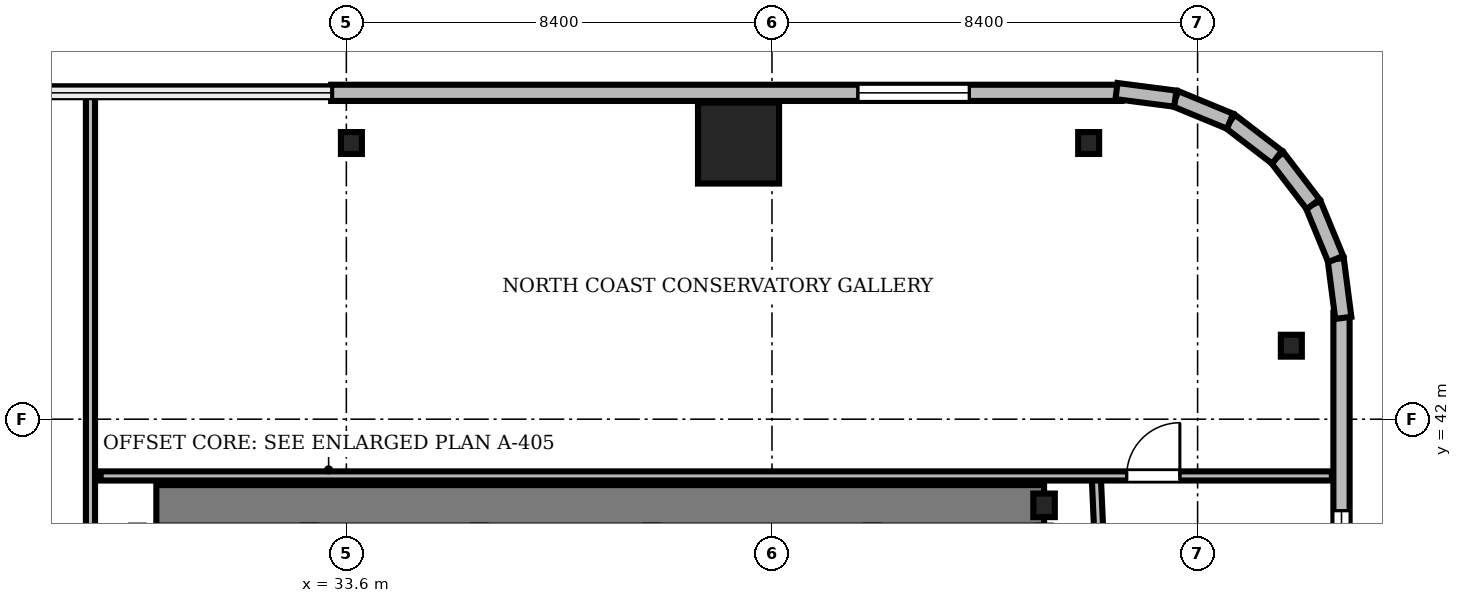
"""IFC4 building model, lengths in metres.
Left out: names, types, materials, properties, quantities, classifications, styles, units other than length and angle.
Written with IfcOpenShell. Run it as: python <this file> out.ifc"""

import sys

from ifc_helpers import new_model, si_unit, direction, frame, frame_2d, origin, origin_2d, place, context, subcontext, project, spatial, rectangle, i_section, extrude, source, transform, mapped, element, fill, save


model = new_model("IFC4")
c1 = context("Model", 3, precision=1e-05, world=origin(), true_north=direction((0.0, 1.0)))
c2 = subcontext(c1, "Body", "Model", "MODEL_VIEW")
j1 = project(units=[si_unit("LENGTHUNIT", "METRE"), si_unit("PLANEANGLEUNIT", "RADIAN")], contexts=[c1])
p1 = place(None, origin())
s1 = spatial("IfcSite", under=j1, at=p1, CompositionType="ELEMENT")
p2 = place(p1, origin())
s2 = spatial("IfcBuilding", under=s1, at=p2, CompositionType="ELEMENT")
p3 = place(p2, frame((0.0, 0.0, 98.7)))
s3 = spatial("IfcBuildingStorey", under=s2, at=p3, CompositionType="ELEMENT", Elevation=98.7)
m1 = source(origin(), c2, "Body", "SweptSolid", [
    extrude(rectangle(XDim=17.52, YDim=0.8, at=frame_2d((8.76, 0.0))), origin(), (0.0, 0.0, 1.0), 4.76),
])
p4 = place(p3, frame((29.85, 40.3, 0.0), z_axis=(0.0, 0.0, 1.0), x_axis=(1.0, 0.0, 0.0)))
e1 = element("IfcWall", 1, at=p4, inside=s3, PredefinedType="SHEAR", context=c2, shape_type="MappedRepresentation", body=[
    mapped(m1, transform((0.0, 0.0, 0.0), scale=1.0)),
])
m2 = source(origin(), c2, "Body", "SweptSolid", [
    extrude(i_section(OverallWidth=0.424, OverallDepth=0.465, WebThickness=0.035, FlangeThickness=0.056, FilletRadius=0.015, at=origin_2d()), origin(), (0.0, 0.0, 1.0), 4.76),
])
p5 = place(p3, frame((47.37, 40.3, 0.0), z_axis=(0.0, 0.0, 1.0), x_axis=(1.0, 0.0, 0.0)))
e2 = element("IfcColumn", 2, at=p5, inside=s3, PredefinedType="COLUMN", context=c2, shape_type="MappedRepresentation", body=[
    mapped(m2, transform((0.0, 0.0, 0.0), scale=1.0)),
])
m3 = source(origin(), c2, "Body", "SweptSolid", [
    extrude(rectangle(XDim=1.6, YDim=1.6, at=origin_2d()), origin(), (0.0, 0.0, 1.0), 4.76),
])
p6 = place(p3, frame((41.34, 47.45, 0.0), z_axis=(0.0, 0.0, 1.0), x_axis=(1.0, 0.0, 0.0)))
e3 = element("IfcColumn", 3, at=p6, inside=s3, PredefinedType="COLUMN", context=c2, shape_type="MappedRepresentation", body=[
    mapped(m3, transform((0.0, 0.0, 0.0), scale=1.0)),
])
m4 = source(origin(), c2, "Body", "SweptSolid", [
    extrude(i_section(OverallWidth=0.414, OverallDepth=0.432, WebThickness=0.026, FlangeThickness=0.04, FilletRadius=0.015, at=origin_2d()), origin(), (0.0, 0.0, 1.0), 4.76),
])
for number, where, z_axis, x_axis in (
    (4, (52.25, 43.45, 0.0), (0.0, 0.0, 1.0), (1.0, 0.0, 0.0)),
    (5, (48.25, 47.45, 0.0), (0.0, 0.0, 1.0), (1.0, 0.0, 0.0)),
    (6, (33.7, 47.45, 0.0), (0.0, 0.0, 1.0), (1.0, 0.0, 0.0)),
):
    element("IfcColumn", number, at=place(p3, frame(where, z_axis=z_axis, x_axis=x_axis)), inside=s3, PredefinedType="COLUMN", context=c2, shape_type="MappedRepresentation", body=[
        mapped(m4, transform((0.0, 0.0, 0.0), scale=1.0)),
    ])
m5 = source(origin(), c2, "Body", "SweptSolid", [
    extrude(rectangle(XDim=15.6, YDim=0.32, at=frame_2d((7.8, 0.0))), origin(), (0.0, 0.0, 1.0), 4.76),
])
p7 = place(p3, frame((48.9, 48.44, 0.0), z_axis=(0.0, 0.0, 1.0), x_axis=(-1.0, 0.0, 0.0)))
e7 = element("IfcWall", 7, at=p7, inside=s3, PredefinedType="SOLIDWALL", context=c2, shape_type="MappedRepresentation", body=[
    mapped(m5, transform((0.0, 0.0, 0.0), scale=1.0)),
])
m6 = source(origin(), c2, "Body", "SweptSolid", [
    extrude(rectangle(XDim=2.2, YDim=2.4, at=frame_2d((1.1, 1.2))), frame((0.0, 0.17, 0.0), z_axis=(0.0, -1.0, 0.0), x_axis=(1.0, 0.0, 0.0)), (0.0, 0.0, 1.0), 0.34),
])
p8 = place(p7, frame((3.005, 0.0, 0.72)))
e8 = element("IfcOpeningElement", 8, at=p8, cuts=e7, PredefinedType="OPENING", context=c2, shape_type="MappedRepresentation", body=[
    mapped(m6, transform((0.0, 0.0, 0.0), scale=1.0)),
])
m7 = source(origin(), c2, "Body", "SweptSolid", [
    extrude(rectangle(XDim=15.6, YDim=0.32, at=frame_2d((7.8, 0.0))), origin(), (0.0, 0.0, 1.0), 4.76),
])
p9 = place(p3, frame((53.24, 28.5, 0.0), z_axis=(0.0, 0.0, 1.0), x_axis=(0.0, 1.0, 0.0)))
e9 = element("IfcWall", 9, at=p9, inside=s3, PredefinedType="SOLIDWALL", context=c2, shape_type="MappedRepresentation", body=[
    mapped(m7, transform((0.0, 0.0, 0.0), scale=1.0)),
])
p10 = place(p9, frame((9.495, 0.0, 0.72)))
e10 = element("IfcOpeningElement", 10, at=p10, cuts=e9, PredefinedType="OPENING", context=c2, shape_type="MappedRepresentation", body=[
    mapped(m6, transform((0.0, 0.0, 0.0), scale=1.0)),
])
m8 = source(origin(), c2, "Body", "SweptSolid", [
    extrude(rectangle(XDim=1.17, YDim=0.32, at=frame_2d((0.585, 0.0))), origin(), (0.0, 0.0, 1.0), 4.76),
])
p11 = place(p3, frame((53.276, 44.0, 0.0), z_axis=(0.0, 0.0, 1.0), x_axis=(-0.128295670475, 0.991735963317, 0.0)))
e11 = element("IfcWall", 11, at=p11, inside=s3, PredefinedType="SOLIDWALL", context=c2, shape_type="MappedRepresentation", body=[
    mapped(m8, transform((0.0, 0.0, 0.0), scale=1.0)),
])
m9 = source(origin(), c2, "Body", "SweptSolid", [
    extrude(rectangle(XDim=1.169, YDim=0.32, at=frame_2d((0.584, 0.0))), origin(), (0.0, 0.0, 1.0), 4.76),
])
p12 = place(p3, frame((53.125, 45.16, 0.0), z_axis=(0.0, 0.0, 1.0), x_axis=(-0.381054331552, 0.924552646638, 0.0)))
e12 = element("IfcWall", 12, at=p12, inside=s3, PredefinedType="SOLIDWALL", context=c2, shape_type="MappedRepresentation", body=[
    mapped(m9, transform((0.0, 0.0, 0.0), scale=1.0)),
])
m10 = source(origin(), c2, "Body", "SweptSolid", [
    extrude(rectangle(XDim=1.169, YDim=0.32, at=frame_2d((0.584, 0.0))), origin(), (0.0, 0.0, 1.0), 4.76),
])
p13 = place(p3, frame((52.68, 46.241, 0.0), z_axis=(0.0, 0.0, 1.0), x_axis=(-0.608387696831, 0.793639975269, 0.0)))
e13 = element("IfcWall", 13, at=p13, inside=s3, PredefinedType="SOLIDWALL", context=c2, shape_type="MappedRepresentation", body=[
    mapped(m10, transform((0.0, 0.0, 0.0), scale=1.0)),
])
m11 = source(origin(), c2, "Body", "SweptSolid", [
    extrude(rectangle(XDim=1.169, YDim=0.32, at=frame_2d((0.584, 0.0))), origin(), (0.0, 0.0, 1.0), 4.76),
])
p14 = place(p3, frame((51.969, 47.169, 0.0), z_axis=(0.0, 0.0, 1.0), x_axis=(-0.793663520347, 0.608356981114, 0.0)))
e14 = element("IfcWall", 14, at=p14, inside=s3, PredefinedType="SOLIDWALL", context=c2, shape_type="MappedRepresentation", body=[
    mapped(m11, transform((0.0, 0.0, 0.0), scale=1.0)),
])
p15 = place(p3, frame((51.041, 47.88, 0.0), z_axis=(0.0, 0.0, 1.0), x_axis=(-0.924552646638, 0.381054331552, 0.0)))
e15 = element("IfcWall", 15, at=p15, inside=s3, PredefinedType="SOLIDWALL", context=c2, shape_type="MappedRepresentation", body=[
    mapped(m9, transform((0.0, 0.0, 0.0), scale=1.0)),
])
p16 = place(p3, frame((49.96, 48.325, 0.0), z_axis=(0.0, 0.0, 1.0), x_axis=(-0.991735963317, 0.128295670475, 0.0)))
e16 = element("IfcWall", 16, at=p16, inside=s3, PredefinedType="SOLIDWALL", context=c2, shape_type="MappedRepresentation", body=[
    mapped(m8, transform((0.0, 0.0, 0.0), scale=1.0)),
])
m12 = source(origin(), c2, "Body", "SweptSolid", [
    extrude(rectangle(XDim=27.106, YDim=0.18, at=frame_2d((13.553, 0.0))), origin(), (0.0, 0.0, 1.0), 4.152),
])
p17 = place(p3, frame((49.6, 13.8, 0.0), z_axis=(0.0, 0.0, 1.0), x_axis=(-0.044277164483, 0.999019285452, 0.0)))
e17 = element("IfcWall", 17, at=p17, inside=s3, PredefinedType="PARTITIONING", context=c2, shape_type="MappedRepresentation", body=[
    mapped(m12, transform((0.0, 0.0, 0.0), scale=1.0)),
])
m13 = source(origin(), c2, "Body", "SweptSolid", [
    extrude(rectangle(XDim=1.8, YDim=2.4, at=frame_2d((0.9, 1.2))), frame((0.0, 0.1, 0.0), z_axis=(0.0, -1.0, 0.0), x_axis=(1.0, 0.0, 0.0)), (0.0, 0.0, 1.0), 0.2),
])
p18 = place(p17, frame((2.4, 0.0, 0.0)))
e18 = element("IfcOpeningElement", 18, at=p18, cuts=e17, PredefinedType="OPENING", context=c2, shape_type="MappedRepresentation", body=[
    mapped(m13, transform((0.0, 0.0, 0.0), scale=1.0)),
])
m14 = source(origin(), c2, "Body", "SweptSolid", [
    extrude(rectangle(XDim=1.05, YDim=2.2, at=frame_2d((0.525, 1.1))), frame((0.0, 0.1, 0.0), z_axis=(0.0, -1.0, 0.0), x_axis=(1.0, 0.0, 0.0)), (0.0, 0.0, 1.0), 0.2),
])
p19 = place(p17, frame((19.2, 0.0, 0.0)))
e19 = element("IfcOpeningElement", 19, at=p19, cuts=e17, PredefinedType="OPENING", context=c2, shape_type="MappedRepresentation", body=[
    mapped(m14, transform((0.0, 0.0, 0.0), scale=1.0)),
])
m15 = source(origin(), c2, "Body", "SweptSolid", [
    extrude(rectangle(XDim=24.3, YDim=0.18, at=frame_2d((12.15, 0.0))), origin(), (0.0, 0.0, 1.0), 4.002),
])
p20 = place(p3, frame((28.75, 40.88, 0.0), z_axis=(0.0, 0.0, 1.0), x_axis=(1.0, 0.0, 0.0)))
e20 = element("IfcWall", 20, at=p20, inside=s3, PredefinedType="PARTITIONING", context=c2, shape_type="MappedRepresentation", body=[
    mapped(m15, transform((0.0, 0.0, 0.0), scale=1.0)),
])
p21 = place(p20, frame((20.25, 0.0, 0.0)))
e21 = element("IfcOpeningElement", 21, at=p21, cuts=e20, PredefinedType="OPENING", context=c2, shape_type="MappedRepresentation", body=[
    mapped(m14, transform((0.0, 0.0, 0.0), scale=1.0)),
])
m16 = source(origin(), c2, "Body", "SweptSolid", [
    extrude(rectangle(XDim=8.933, YDim=0.18, at=frame_2d((4.466, 0.0))), origin(), (0.0, 0.0, 1.0), 4.002),
])
p22 = place(p3, frame((28.55, 39.547, 0.0), z_axis=(0.0, 0.0, 1.0), x_axis=(0.0, 1.0, 0.0)))
e22 = element("IfcWall", 22, at=p22, inside=s3, PredefinedType="PARTITIONING", context=c2, shape_type="MappedRepresentation", body=[
    mapped(m16, transform((0.0, 0.0, 0.0), scale=1.0)),
])
m17 = source(origin(), c2, "Body", "SweptSolid", [
    extrude(rectangle(XDim=2.2, YDim=2.4, at=frame_2d((1.1, 1.2))), frame((0.0, 0.03, 0.0), z_axis=(0.0, -1.0, 0.0), x_axis=(1.0, 0.0, 0.0)), (0.0, 0.0, 1.0), 0.06),
])
p23 = place(p8, origin())
e23 = element("IfcWindow", 23, at=p23, inside=s3, PartitioningType="SINGLE_PANEL", PredefinedType="WINDOW", context=c2, shape_type="MappedRepresentation", body=[
    mapped(m17, transform((0.0, 0.0, 0.0), scale=1.0)),
])
fill(e8, e23)
p24 = place(p10, origin())
e24 = element("IfcWindow", 24, at=p24, inside=s3, PartitioningType="SINGLE_PANEL", PredefinedType="WINDOW", context=c2, shape_type="MappedRepresentation", body=[
    mapped(m17, transform((0.0, 0.0, 0.0), scale=1.0)),
])
fill(e10, e24)
m18 = source(origin(), c2, "Body", "SweptSolid", [
    extrude(rectangle(XDim=1.05, YDim=2.2, at=frame_2d((0.525, 1.1))), frame((0.0, 0.025, 0.0), z_axis=(0.0, -1.0, 0.0), x_axis=(1.0, 0.0, 0.0)), (0.0, 0.0, 1.0), 0.05),
])
p25 = place(p21, origin())
e25 = element("IfcDoor", 25, at=p25, inside=s3, OperationType="SINGLE_SWING_RIGHT", PredefinedType="DOOR", context=c2, shape_type="MappedRepresentation", body=[
    mapped(m18, transform((0.0, 0.0, 0.0), scale=1.0)),
])
fill(e21, e25)
save(model, sys.argv[1])
